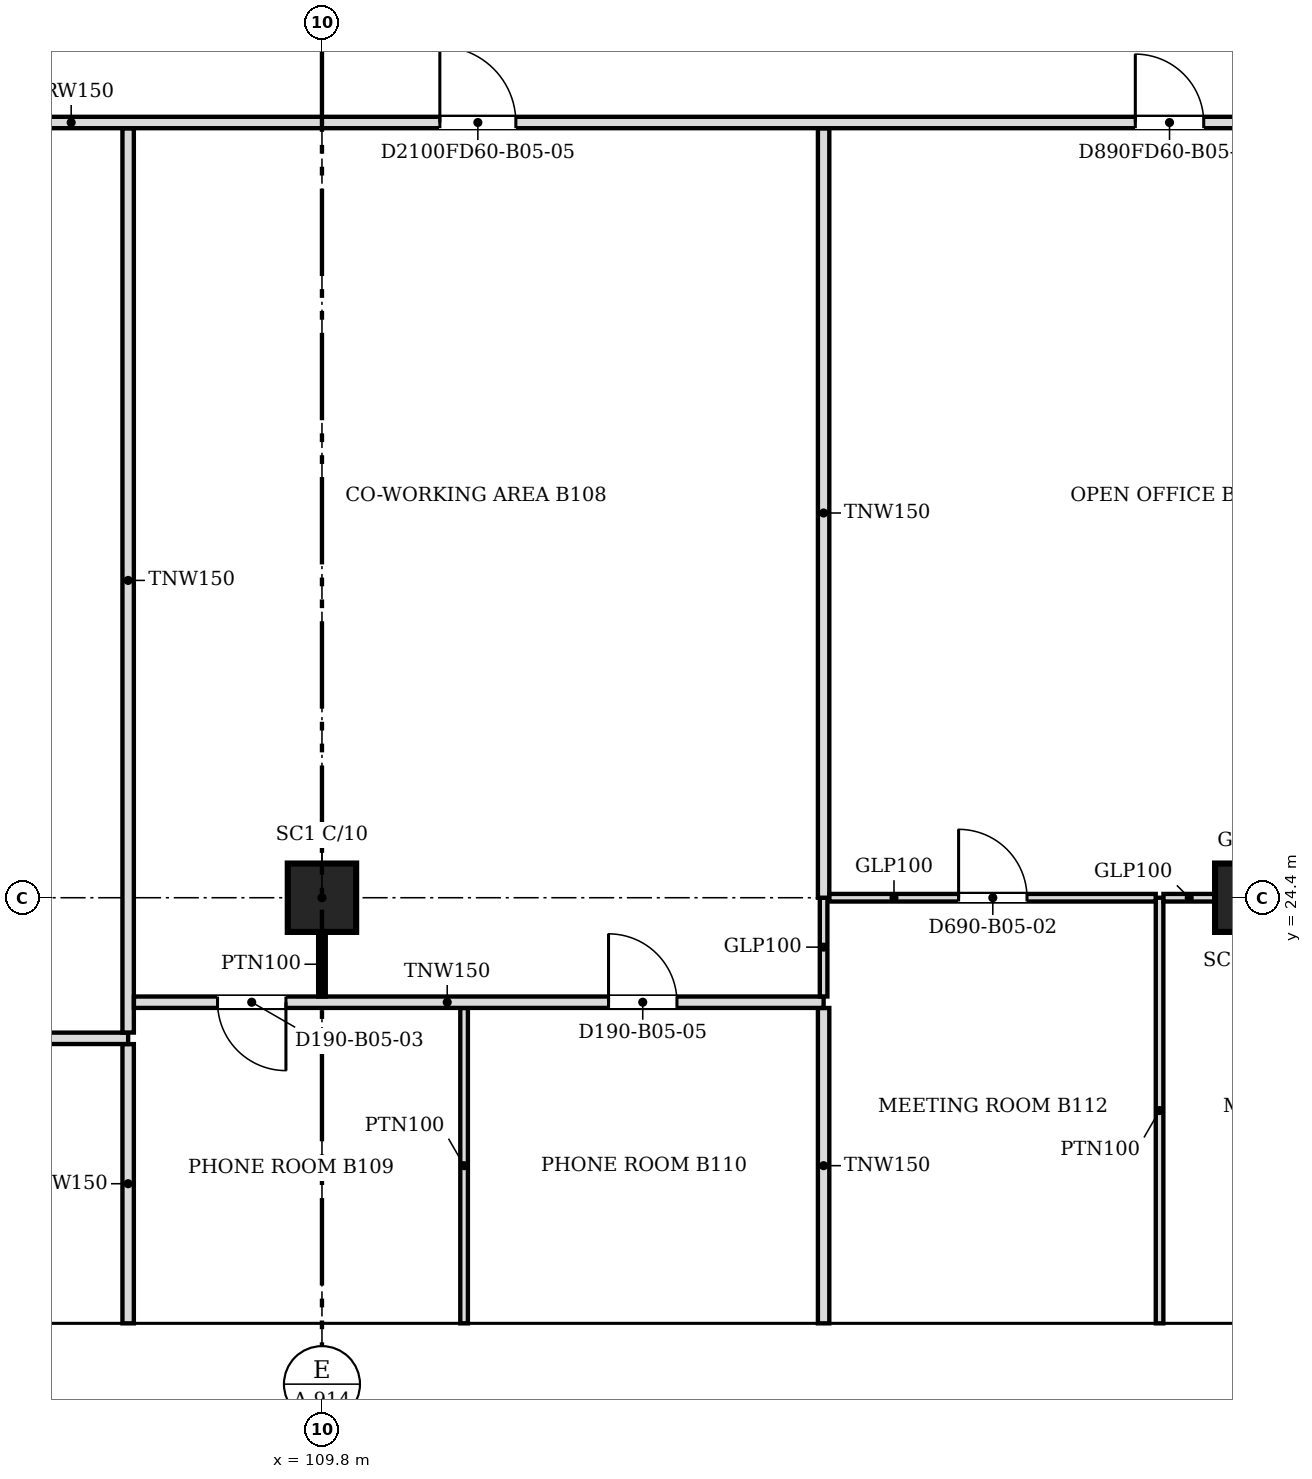
"""IFC4 building model, lengths in metres.
Left out: names, types, materials, properties, quantities, classifications, styles, units other than length and angle.
Written with IfcOpenShell. Run it as: python <this file> out.ifc"""

import sys

from ifc_helpers import new_model, si_unit, direction, frame, frame_2d, origin, origin_2d, place, context, subcontext, project, spatial, polyline, rectangle, outline, extrude, faceted_brep, source, transform, mapped, element, fill, save


model = new_model("IFC4")
c1 = context("Model", 3, precision=1e-05, world=origin(), true_north=direction((0.0, 1.0)))
c2 = subcontext(c1, "Body", "Model", "MODEL_VIEW")
j1 = project(units=[si_unit("LENGTHUNIT", "METRE"), si_unit("PLANEANGLEUNIT", "RADIAN")], contexts=[c1])
p1 = place(None, origin())
s1 = spatial("IfcSite", under=j1, at=p1, CompositionType="ELEMENT")
p2 = place(p1, origin())
s2 = spatial("IfcBuilding", under=s1, at=p2, CompositionType="ELEMENT")
p3 = place(p2, frame((0.0, 0.0, 52.4)))
s3 = spatial("IfcBuildingStorey", under=s2, at=p3, CompositionType="ELEMENT", Elevation=52.4)
for number, where, z_axis, x_axis in (
    (1, (109.8, 24.4, 0.0), (0.0, 0.0, 1.0), (1.0, 0.0, 0.0)),
    (2, (122.0, 24.4, 0.0), (0.0, 0.0, 1.0), (1.0, 0.0, 0.0)),
):
    element("IfcColumn", number, at=place(p3, frame(where, z_axis=z_axis, x_axis=x_axis)), inside=s3, PredefinedType="COLUMN", context=c2, shape_type="SweptSolid", body=[
        extrude(rectangle(XDim=0.9, YDim=0.9, at=origin_2d()), origin(), (0.0, 0.0, 1.0), 3.6),
    ])
m1 = source(origin(), c2, "Body", "SweptSolid", [
    extrude(outline(polyline([(3.05, 0.0), (6.1, 3.8), (3.05, 7.6), (0.0, 3.8), (3.05, 0.0)])), frame((0.0, 0.25, 0.0), z_axis=(0.0, -1.0, 0.0), x_axis=(1.0, 0.0, 0.0)), (0.0, 0.0, 1.0), 0.5),
])
p4 = place(p3, frame((103.7, 18.55, -3.8), z_axis=(0.0, 0.0, 1.0), x_axis=(1.0, 0.0, 0.0)))
e3 = element("IfcWall", 3, at=p4, inside=s3, PredefinedType="SOLIDWALL", context=c2, shape_type="MappedRepresentation", body=[
    mapped(m1, transform((0.0, 0.0, 0.0), scale=1.0)),
])
m2 = source(origin(), c2, "Body", "SweptSolid", [
    extrude(outline(polyline([(3.05, 0.399), (5.78, 3.8), (3.05, 7.2), (0.321, 3.8), (3.05, 0.399)])), frame((0.0, 0.26, 0.0), z_axis=(0.0, -1.0, 0.0), x_axis=(1.0, 0.0, 0.0)), (0.0, 0.0, 1.0), 0.52),
])
p5 = place(p4, origin())
e4 = element("IfcOpeningElement", 4, at=p5, cuts=e3, PredefinedType="OPENING", context=c2, shape_type="MappedRepresentation", body=[
    mapped(m2, transform((0.0, 0.0, 0.0), scale=1.0)),
])
m3 = source(origin(), c2, "Body", "Brep", [
    faceted_brep([(3.05, -0.25, 0.0), (6.1, -0.25, 3.8), (6.1, -0.25, 3.8), (3.05, -0.25, 7.6), (0.0, -0.25, 3.8), (0.0, 0.25, 3.8), (3.05, 0.25, 7.6), (6.1, 0.25, 3.8), (6.1, 0.25, 3.8), (3.05, 0.25, 0.0)], [[[0, 1, 2, 3, 4]], [[5, 6, 7, 8, 9]], [[9, 8, 1, 0]], [[7, 6, 3, 2]], [[6, 5, 4, 3]], [[5, 9, 0, 4]], [[1, 8, 7, 2]]]),
])
p6 = place(p3, frame((109.8, 18.55, -3.8), z_axis=(0.0, 0.0, 1.0), x_axis=(1.0, 0.0, 0.0)))
e5 = element("IfcWall", 5, at=p6, inside=s3, PredefinedType="SOLIDWALL", context=c2, shape_type="MappedRepresentation", body=[
    mapped(m3, transform((0.0, 0.0, 0.0), scale=1.0)),
])
p7 = place(p6, origin())
e6 = element("IfcOpeningElement", 6, at=p7, cuts=e5, PredefinedType="OPENING", context=c2, shape_type="MappedRepresentation", body=[
    mapped(m2, transform((0.0, 0.0, 0.0), scale=1.0)),
])
p8 = place(p3, frame((115.9, 18.55, -3.8), z_axis=(0.0, 0.0, 1.0), x_axis=(1.0, 0.0, 0.0)))
e7 = element("IfcWall", 7, at=p8, inside=s3, PredefinedType="SOLIDWALL", context=c2, shape_type="MappedRepresentation", body=[
    mapped(m1, transform((0.0, 0.0, 0.0), scale=1.0)),
])
p9 = place(p8, origin())
e8 = element("IfcOpeningElement", 8, at=p9, cuts=e7, PredefinedType="OPENING", context=c2, shape_type="MappedRepresentation", body=[
    mapped(m2, transform((0.0, 0.0, 0.0), scale=1.0)),
])
p10 = place(p2, frame((0.0, 0.0, 56.2)))
s4 = spatial("IfcBuildingStorey", under=s2, at=p10, CompositionType="ELEMENT", Elevation=56.2)
m4 = source(origin(), c2, "Body", "SweptSolid", [
    extrude(outline(polyline([(3.05, 0.0), (6.1, 3.8), (3.05, 7.6), (0.0, 3.8), (3.05, 0.0)])), frame((0.0, 0.25, 0.0), z_axis=(0.0, -1.0, 0.0), x_axis=(1.0, 0.0, 0.0)), (0.0, 0.0, 1.0), 0.5),
])
p11 = place(p10, frame((100.65, 18.55, -3.8), z_axis=(0.0, 0.0, 1.0), x_axis=(1.0, 0.0, 0.0)))
e9 = element("IfcWall", 9, at=p11, inside=s4, PredefinedType="SOLIDWALL", context=c2, shape_type="MappedRepresentation", body=[
    mapped(m4, transform((0.0, 0.0, 0.0), scale=1.0)),
])
m5 = source(origin(), c2, "Body", "SweptSolid", [
    extrude(outline(polyline([(3.05, 0.399), (5.78, 3.8), (3.05, 7.201), (0.321, 3.8), (3.05, 0.399)])), frame((0.0, 0.26, 0.0), z_axis=(0.0, -1.0, 0.0), x_axis=(1.0, 0.0, 0.0)), (0.0, 0.0, 1.0), 0.52),
])
p12 = place(p11, origin())
e10 = element("IfcOpeningElement", 10, at=p12, cuts=e9, PredefinedType="OPENING", context=c2, shape_type="MappedRepresentation", body=[
    mapped(m5, transform((0.0, 0.0, 0.0), scale=1.0)),
])
p13 = place(p10, frame((106.75, 18.55, -3.8), z_axis=(0.0, 0.0, 1.0), x_axis=(1.0, 0.0, 0.0)))
e11 = element("IfcWall", 11, at=p13, inside=s4, PredefinedType="SOLIDWALL", context=c2, shape_type="MappedRepresentation", body=[
    mapped(m4, transform((0.0, 0.0, 0.0), scale=1.0)),
])
p14 = place(p13, origin())
e12 = element("IfcOpeningElement", 12, at=p14, cuts=e11, PredefinedType="OPENING", context=c2, shape_type="MappedRepresentation", body=[
    mapped(m5, transform((0.0, 0.0, 0.0), scale=1.0)),
])
m6 = source(origin(), c2, "Body", "Brep", [
    faceted_brep([(3.05, -0.25, 0.0), (6.1, -0.25, 3.8), (6.1, -0.25, 3.8), (3.05, -0.25, 7.6), (0.0, -0.25, 3.8), (0.0, 0.25, 3.8), (3.05, 0.25, 7.6), (6.1, 0.25, 3.8), (6.1, 0.25, 3.8), (3.05, 0.25, 0.0)], [[[0, 1, 2, 3, 4]], [[5, 6, 7, 8, 9]], [[9, 8, 1, 0]], [[7, 6, 3, 2]], [[6, 5, 4, 3]], [[5, 9, 0, 4]], [[1, 8, 7, 2]]]),
])
p15 = place(p10, frame((112.85, 18.55, -3.8), z_axis=(0.0, 0.0, 1.0), x_axis=(1.0, 0.0, 0.0)))
e13 = element("IfcWall", 13, at=p15, inside=s4, PredefinedType="SOLIDWALL", context=c2, shape_type="MappedRepresentation", body=[
    mapped(m6, transform((0.0, 0.0, 0.0), scale=1.0)),
])
p16 = place(p15, origin())
e14 = element("IfcOpeningElement", 14, at=p16, cuts=e13, PredefinedType="OPENING", context=c2, shape_type="MappedRepresentation", body=[
    mapped(m5, transform((0.0, 0.0, 0.0), scale=1.0)),
])
p17 = place(p10, frame((118.95, 18.55, -3.8), z_axis=(0.0, 0.0, 1.0), x_axis=(1.0, 0.0, 0.0)))
e15 = element("IfcWall", 15, at=p17, inside=s4, PredefinedType="SOLIDWALL", context=c2, shape_type="MappedRepresentation", body=[
    mapped(m4, transform((0.0, 0.0, 0.0), scale=1.0)),
])
p18 = place(p17, origin())
e16 = element("IfcOpeningElement", 16, at=p18, cuts=e15, PredefinedType="OPENING", context=c2, shape_type="MappedRepresentation", body=[
    mapped(m5, transform((0.0, 0.0, 0.0), scale=1.0)),
])
p19 = place(p3, frame((107.25, 18.8, 0.0), z_axis=(0.0, 0.0, 1.0), x_axis=(0.0, 1.0, 0.0)))
e17 = element("IfcWall", 17, at=p19, inside=s3, PredefinedType="PARTITIONING", context=c2, shape_type="SweptSolid", body=[
    extrude(rectangle(XDim=3.674, YDim=0.15, at=frame_2d((1.837, 0.0))), origin(), (0.0, 0.0, 1.0), 3.067),
])
p20 = place(p3, frame((111.67, 18.8, 0.0), z_axis=(0.0, 0.0, 1.0), x_axis=(0.0, 1.0, 0.0)))
e18 = element("IfcWall", 18, at=p20, inside=s3, PredefinedType="PARTITIONING", context=c2, shape_type="SweptSolid", body=[
    extrude(rectangle(XDim=4.149, YDim=0.1, at=frame_2d((2.074, 0.0))), origin(), (0.0, 0.0, 1.0), 3.067),
])
p21 = place(p3, frame((116.4, 18.8, 0.0), z_axis=(0.0, 0.0, 1.0), x_axis=(0.0, 1.0, 0.0)))
e19 = element("IfcWall", 19, at=p21, inside=s3, PredefinedType="PARTITIONING", context=c2, shape_type="SweptSolid", body=[
    extrude(rectangle(XDim=4.149, YDim=0.15, at=frame_2d((2.074, 0.0))), origin(), (0.0, 0.0, 1.0), 3.067),
])
p22 = place(p3, frame((120.82, 18.8, 0.0), z_axis=(0.0, 0.0, 1.0), x_axis=(0.0, 1.0, 0.0)))
e20 = element("IfcWall", 20, at=p22, inside=s3, PredefinedType="PARTITIONING", context=c2, shape_type="SweptSolid", body=[
    extrude(rectangle(XDim=5.6, YDim=0.1, at=frame_2d((2.8, 0.0))), origin(), (0.0, 0.0, 1.0), 3.067),
])
p23 = place(p3, frame((107.25, 22.55, 0.0), z_axis=(0.0, 0.0, 1.0), x_axis=(-1.0, 0.0, 0.0)))
e21 = element("IfcWall", 21, at=p23, inside=s3, PredefinedType="PARTITIONING", context=c2, shape_type="SweptSolid", body=[
    extrude(rectangle(XDim=12.124, YDim=0.15, at=frame_2d((6.062, 0.0))), origin(), (0.0, 0.0, 1.0), 3.067),
])
m7 = source(origin(), c2, "Body", "SweptSolid", [
    extrude(rectangle(XDim=0.9, YDim=2.1, at=frame_2d((0.45, 1.05))), frame((0.0, 0.085, 0.0), z_axis=(0.0, -1.0, 0.0), x_axis=(1.0, 0.0, 0.0)), (0.0, 0.0, 1.0), 0.17),
])
p24 = place(p23, frame((8.624, 0.0, 0.0)))
e22 = element("IfcOpeningElement", 22, at=p24, cuts=e21, PredefinedType="OPENING", context=c2, shape_type="MappedRepresentation", body=[
    mapped(m7, transform((0.0, 0.0, 0.0), scale=1.0)),
])
p25 = place(p23, frame((2.706, 0.0, 0.0)))
e23 = element("IfcOpeningElement", 23, at=p25, cuts=e21, PredefinedType="OPENING", context=c2, shape_type="MappedRepresentation", body=[
    mapped(m7, transform((0.0, 0.0, 0.0), scale=1.0)),
])
p26 = place(p3, frame((107.25, 22.626, 0.0), z_axis=(0.0, 0.0, 1.0), x_axis=(0.0, 1.0, 0.0)))
e24 = element("IfcWall", 24, at=p26, inside=s3, PredefinedType="PARTITIONING", context=c2, shape_type="SweptSolid", body=[
    extrude(rectangle(XDim=11.898, YDim=0.15, at=frame_2d((5.949, 0.0))), origin(), (0.0, 0.0, 1.0), 3.067),
])
p27 = place(p3, frame((116.4, 23.025, 0.0), z_axis=(0.0, 0.0, 1.0), x_axis=(-1.0, 0.0, 0.0)))
e25 = element("IfcWall", 25, at=p27, inside=s3, PredefinedType="PARTITIONING", context=c2, shape_type="SweptSolid", body=[
    extrude(rectangle(XDim=9.074, YDim=0.15, at=frame_2d((4.537, 0.0))), origin(), (0.0, 0.0, 1.0), 3.067),
])
p28 = place(p27, frame((7.074, 0.0, 0.0)))
e26 = element("IfcOpeningElement", 26, at=p28, cuts=e25, PredefinedType="OPENING", context=c2, shape_type="MappedRepresentation", body=[
    mapped(m7, transform((0.0, 0.0, 0.0), scale=1.0)),
])
p29 = place(p27, frame((1.93, 0.0, 0.0)))
e27 = element("IfcOpeningElement", 27, at=p29, cuts=e25, PredefinedType="OPENING", context=c2, shape_type="MappedRepresentation", body=[
    mapped(m7, transform((0.0, 0.0, 0.0), scale=1.0)),
])
p30 = place(p3, frame((116.4, 23.101, 0.0), z_axis=(0.0, 0.0, 1.0), x_axis=(0.0, 1.0, 0.0)))
e28 = element("IfcWall", 28, at=p30, inside=s3, PredefinedType="PARTITIONING", context=c2, shape_type="SweptSolid", body=[
    extrude(rectangle(XDim=1.298, YDim=0.1, at=frame_2d((0.649, 0.0))), origin(), (0.0, 0.0, 1.0), 3.067),
])
p31 = place(p3, frame((109.8, 23.95, 0.0), z_axis=(0.0, 0.0, 1.0), x_axis=(0.0, -1.0, 0.0)))
e29 = element("IfcWall", 29, at=p31, inside=s3, PredefinedType="PARTITIONING", context=c2, shape_type="SweptSolid", body=[
    extrude(rectangle(XDim=0.85, YDim=0.1, at=frame_2d((0.425, 0.0))), origin(), (0.0, 0.0, 1.0), 3.067),
])
p32 = place(p3, frame((116.4, 24.4, 0.0), z_axis=(0.0, 0.0, 1.0), x_axis=(0.0, 1.0, 0.0)))
e30 = element("IfcWall", 30, at=p32, inside=s3, PredefinedType="PARTITIONING", context=c2, shape_type="SweptSolid", body=[
    extrude(rectangle(XDim=10.124, YDim=0.15, at=frame_2d((5.062, 0.0))), origin(), (0.0, 0.0, 1.0), 3.067),
])
p33 = place(p3, frame((120.769, 24.4, 0.0), z_axis=(0.0, 0.0, 1.0), x_axis=(-1.0, 0.0, 0.0)))
e31 = element("IfcWall", 31, at=p33, inside=s3, PredefinedType="PARTITIONING", context=c2, shape_type="SweptSolid", body=[
    extrude(rectangle(XDim=4.293, YDim=0.1, at=frame_2d((2.146, 0.0))), origin(), (0.0, 0.0, 1.0), 3.067),
])
m8 = source(origin(), c2, "Body", "SweptSolid", [
    extrude(rectangle(XDim=0.9, YDim=2.1, at=frame_2d((0.45, 1.05))), frame((0.0, 0.06, 0.0), z_axis=(0.0, -1.0, 0.0), x_axis=(1.0, 0.0, 0.0)), (0.0, 0.0, 1.0), 0.12),
])
p34 = place(p33, frame((1.693, 0.0, 0.0)))
e32 = element("IfcOpeningElement", 32, at=p34, cuts=e31, PredefinedType="OPENING", context=c2, shape_type="MappedRepresentation", body=[
    mapped(m8, transform((0.0, 0.0, 0.0), scale=1.0)),
])
p35 = place(p3, frame((120.871, 24.4, 0.0), z_axis=(0.0, 0.0, 1.0), x_axis=(1.0, 0.0, 0.0)))
e33 = element("IfcWall", 33, at=p35, inside=s3, PredefinedType="PARTITIONING", context=c2, shape_type="SweptSolid", body=[
    extrude(rectangle(XDim=0.678, YDim=0.1, at=frame_2d((0.339, 0.0))), origin(), (0.0, 0.0, 1.0), 3.067),
])
p36 = place(p3, frame((133.7, 34.6, 0.0), z_axis=(0.0, 0.0, 1.0), x_axis=(-1.0, 0.0, 0.0)))
e34 = element("IfcWall", 34, at=p36, inside=s3, PredefinedType="PARTITIONING", context=c2, shape_type="SweptSolid", body=[
    extrude(rectangle(XDim=47.8, YDim=0.15, at=frame_2d((23.9, 0.0))), origin(), (0.0, 0.0, 1.0), 3.067),
])
m9 = source(origin(), c2, "Body", "SweptSolid", [
    extrude(rectangle(XDim=1.0, YDim=2.1, at=frame_2d((0.5, 1.05))), frame((0.0, 0.085, 0.0), z_axis=(0.0, -1.0, 0.0), x_axis=(1.0, 0.0, 0.0)), (0.0, 0.0, 1.0), 0.17),
])
p37 = place(p36, frame((3.549, 0.0, 0.0)))
e35 = element("IfcOpeningElement", 35, at=p37, cuts=e34, PredefinedType="OPENING", context=c2, shape_type="MappedRepresentation", body=[
    mapped(m9, transform((0.0, 0.0, 0.0), scale=1.0)),
])
p38 = place(p36, frame((42.7, 0.0, 0.0)))
e36 = element("IfcOpeningElement", 36, at=p38, cuts=e34, PredefinedType="OPENING", context=c2, shape_type="MappedRepresentation", body=[
    mapped(m9, transform((0.0, 0.0, 0.0), scale=1.0)),
])
p39 = place(p36, frame((12.299, 0.0, 0.0)))
e37 = element("IfcOpeningElement", 37, at=p39, cuts=e34, PredefinedType="OPENING", context=c2, shape_type="MappedRepresentation", body=[
    mapped(m7, transform((0.0, 0.0, 0.0), scale=1.0)),
])
p40 = place(p36, frame((21.349, 0.0, 0.0)))
e38 = element("IfcOpeningElement", 38, at=p40, cuts=e34, PredefinedType="OPENING", context=c2, shape_type="MappedRepresentation", body=[
    mapped(m9, transform((0.0, 0.0, 0.0), scale=1.0)),
])
p41 = place(p36, frame((32.05, 0.0, 0.0)))
e39 = element("IfcOpeningElement", 39, at=p41, cuts=e34, PredefinedType="OPENING", context=c2, shape_type="MappedRepresentation", body=[
    mapped(m9, transform((0.0, 0.0, 0.0), scale=1.0)),
])
m10 = source(origin(), c2, "Body", "SweptSolid", [
    extrude(rectangle(XDim=0.9, YDim=2.1, at=frame_2d((0.45, 1.05))), frame((0.0, 0.025, 0.0), z_axis=(0.0, -1.0, 0.0), x_axis=(1.0, 0.0, 0.0)), (0.0, 0.0, 1.0), 0.05),
])
p42 = place(p34, origin())
e40 = element("IfcDoor", 40, at=p42, inside=s3, OperationType="SINGLE_SWING_RIGHT", PredefinedType="DOOR", context=c2, shape_type="MappedRepresentation", body=[
    mapped(m10, transform((0.0, 0.0, 0.0), scale=1.0)),
])
fill(e32, e40)
p43 = place(p28, origin())
e41 = element("IfcDoor", 41, at=p43, inside=s3, OperationType="SINGLE_SWING_LEFT", PredefinedType="DOOR", context=c2, shape_type="MappedRepresentation", body=[
    mapped(m10, transform((0.0, 0.0, 0.0), scale=1.0)),
])
fill(e26, e41)
p44 = place(p29, origin())
e42 = element("IfcDoor", 42, at=p44, inside=s3, OperationType="SINGLE_SWING_RIGHT", PredefinedType="DOOR", context=c2, shape_type="MappedRepresentation", body=[
    mapped(m10, transform((0.0, 0.0, 0.0), scale=1.0)),
])
fill(e27, e42)
p45 = place(p39, origin())
e43 = element("IfcDoor", 43, at=p45, inside=s3, OperationType="SINGLE_SWING_RIGHT", PredefinedType="DOOR", context=c2, shape_type="MappedRepresentation", body=[
    mapped(m10, transform((0.0, 0.0, 0.0), scale=1.0)),
])
fill(e37, e43)
m11 = source(origin(), c2, "Body", "SweptSolid", [
    extrude(rectangle(XDim=1.0, YDim=2.1, at=frame_2d((0.5, 1.05))), frame((0.0, 0.025, 0.0), z_axis=(0.0, -1.0, 0.0), x_axis=(1.0, 0.0, 0.0)), (0.0, 0.0, 1.0), 0.05),
])
p46 = place(p40, origin())
e44 = element("IfcDoor", 44, at=p46, inside=s3, OperationType="SINGLE_SWING_RIGHT", PredefinedType="DOOR", context=c2, shape_type="MappedRepresentation", body=[
    mapped(m11, transform((0.0, 0.0, 0.0), scale=1.0)),
])
fill(e38, e44)
save(model, sys.argv[1])
